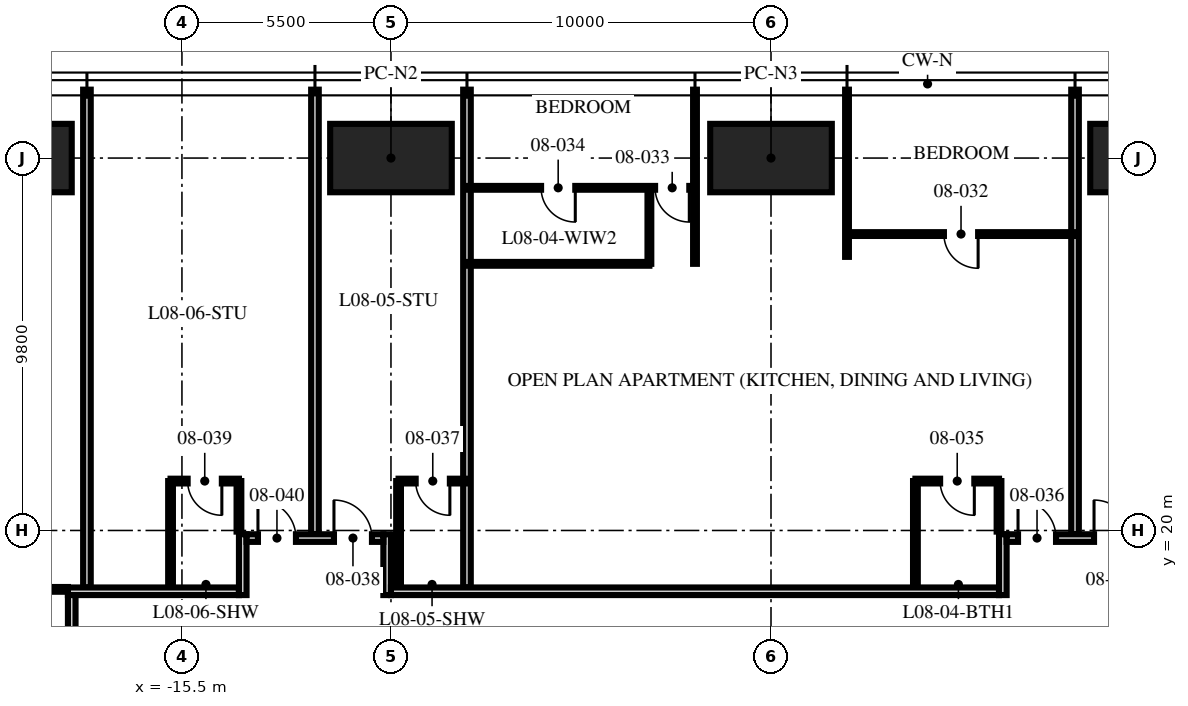
"""IFC4 building model, lengths in metres.
Left out: names, types, materials, properties, quantities, classifications, styles, units other than length and angle.
Written with IfcOpenShell. Run it as: python <this file> out.ifc"""

import sys

from ifc_helpers import new_model, si_unit, direction, frame, frame_2d, origin, origin_2d, place, context, subcontext, project, spatial, rectangle, hollow_rectangle, extrude, element, fill, save


model = new_model("IFC4")
c1 = context("Model", 3, precision=1e-05, world=origin(), true_north=direction((0.0, 1.0)))
c2 = subcontext(c1, "Body", "Model", "MODEL_VIEW")
j1 = project(units=[si_unit("LENGTHUNIT", "METRE"), si_unit("PLANEANGLEUNIT", "RADIAN")], contexts=[c1])
p1 = place(None, origin())
s1 = spatial("IfcSite", under=j1, at=p1, CompositionType="ELEMENT")
p2 = place(p1, origin())
s2 = spatial("IfcBuilding", under=s1, at=p2, CompositionType="ELEMENT")
p3 = place(p2, frame((0.0, 0.0, 36.0)))
s3 = spatial("IfcBuildingStorey", under=s2, at=p3, CompositionType="ELEMENT", Elevation=36.0)
for number, where, z_axis, x_axis in (
    (1, (-20.0, 29.8, 0.0), (0.0, 0.0, 1.0), (1.0, 0.0, 0.0)),
    (2, (-10.0, 29.8, 0.0), (0.0, 0.0, 1.0), (1.0, 0.0, 0.0)),
    (3, (0.0, 29.8, 0.0), (0.0, 0.0, 1.0), (1.0, 0.0, 0.0)),
    (4, (10.0, 29.8, 0.0), (0.0, 0.0, 1.0), (1.0, 0.0, 0.0)),
):
    element("IfcColumn", number, at=place(p3, frame(where, z_axis=z_axis, x_axis=x_axis)), inside=s3, PredefinedType="COLUMN", context=c2, shape_type="SweptSolid", body=[
        extrude(hollow_rectangle(XDim=3.2, YDim=1.8, WallThickness=0.2, at=origin_2d()), origin(), (0.0, 0.0, 1.0), 3.75),
    ])
p4 = place(p3, frame((8.0, 19.9, 0.0), z_axis=(0.0, 0.0, 1.0), x_axis=(0.0, 1.0, 0.0)))
e5 = element("IfcWall", 5, at=p4, inside=s3, PredefinedType="PARTITIONING", context=c2, shape_type="SweptSolid", body=[
    extrude(rectangle(XDim=11.7, YDim=0.2, at=frame_2d((5.85, 0.0))), origin(), (0.0, 0.0, 1.0), 2.71),
])
p5 = place(p3, frame((2.0, 27.2, 0.0), z_axis=(0.0, 0.0, 1.0), x_axis=(0.0, 1.0, 0.0)))
e6 = element("IfcWall", 6, at=p5, inside=s3, PredefinedType="PARTITIONING", context=c2, shape_type="SweptSolid", body=[
    extrude(rectangle(XDim=4.4, YDim=0.1, at=frame_2d((2.2, 0.0))), origin(), (0.0, 0.0, 1.0), 2.71),
])
p6 = place(p3, frame((-2.0, 27.017, 0.0), z_axis=(0.0, 0.0, 1.0), x_axis=(0.0, 1.0, 0.0)))
e7 = element("IfcWall", 7, at=p6, inside=s3, PredefinedType="PARTITIONING", context=c2, shape_type="SweptSolid", body=[
    extrude(rectangle(XDim=4.583, YDim=0.1, at=frame_2d((2.292, 0.0))), origin(), (0.0, 0.0, 1.0), 2.71),
])
p7 = place(p3, frame((-8.0, 18.5, 0.0), z_axis=(0.0, 0.0, 1.0), x_axis=(0.0, 1.0, 0.0)))
e8 = element("IfcWall", 8, at=p7, inside=s3, PredefinedType="PARTITIONING", context=c2, shape_type="SweptSolid", body=[
    extrude(rectangle(XDim=13.1, YDim=0.2, at=frame_2d((6.55, 0.0))), origin(), (0.0, 0.0, 1.0), 2.71),
])
p8 = place(p3, frame((-12.0, 19.9, 0.0), z_axis=(0.0, 0.0, 1.0), x_axis=(0.0, 1.0, 0.0)))
e9 = element("IfcWall", 9, at=p8, inside=s3, PredefinedType="PARTITIONING", context=c2, shape_type="SweptSolid", body=[
    extrude(rectangle(XDim=11.7, YDim=0.2, at=frame_2d((5.85, 0.0))), origin(), (0.0, 0.0, 1.0), 2.71),
])
p9 = place(p3, frame((-18.0, 18.5, 0.0), z_axis=(0.0, 0.0, 1.0), x_axis=(0.0, 1.0, 0.0)))
e10 = element("IfcWall", 10, at=p9, inside=s3, PredefinedType="PARTITIONING", context=c2, shape_type="SweptSolid", body=[
    extrude(rectangle(XDim=13.1, YDim=0.2, at=frame_2d((6.55, 0.0))), origin(), (0.0, 0.0, 1.0), 2.3),
])
p10 = place(p3, frame((8.0, 27.8, 0.0), z_axis=(0.0, 0.0, 1.0), x_axis=(-1.0, 0.0, 0.0)))
e11 = element("IfcWall", 11, at=p10, inside=s3, PredefinedType="PARTITIONING", context=c2, shape_type="SweptSolid", body=[
    extrude(rectangle(XDim=6.0, YDim=0.1, at=frame_2d((3.0, 0.0))), origin(), (0.0, 0.0, 1.0), 2.61),
])
p11 = place(p10, frame((2.55, 0.0, 0.0)))
e12 = element("IfcOpeningElement", 12, at=p11, cuts=e11, PredefinedType="OPENING", context=c2, shape_type="SweptSolid", body=[
    extrude(rectangle(XDim=0.9, YDim=2.1, at=frame_2d((0.45, 1.05))), frame((0.0, 0.06, 0.0), z_axis=(0.0, -1.0, 0.0), x_axis=(1.0, 0.0, 0.0)), (0.0, 0.0, 1.0), 0.12),
])
p12 = place(p3, frame((-2.0, 29.017, 0.0), z_axis=(0.0, 0.0, 1.0), x_axis=(-1.0, 0.0, 0.0)))
e13 = element("IfcWall", 13, at=p12, inside=s3, PredefinedType="PARTITIONING", context=c2, shape_type="SweptSolid", body=[
    extrude(rectangle(XDim=6.0, YDim=0.1, at=frame_2d((3.0, 0.0))), origin(), (0.0, 0.0, 1.0), 2.61),
])
p13 = place(p12, frame((0.15, 0.0, 0.0)))
e14 = element("IfcOpeningElement", 14, at=p13, cuts=e13, PredefinedType="OPENING", context=c2, shape_type="SweptSolid", body=[
    extrude(rectangle(XDim=0.9, YDim=2.1, at=frame_2d((0.45, 1.05))), frame((0.0, 0.06, 0.0), z_axis=(0.0, -1.0, 0.0), x_axis=(1.0, 0.0, 0.0)), (0.0, 0.0, 1.0), 0.12),
])
p14 = place(p12, frame((3.15, 0.0, 0.0)))
e15 = element("IfcOpeningElement", 15, at=p14, cuts=e13, PredefinedType="OPENING", context=c2, shape_type="SweptSolid", body=[
    extrude(rectangle(XDim=0.9, YDim=2.1, at=frame_2d((0.45, 1.05))), frame((0.0, 0.06, 0.0), z_axis=(0.0, -1.0, 0.0), x_axis=(1.0, 0.0, 0.0)), (0.0, 0.0, 1.0), 0.12),
])
p15 = place(p3, frame((-3.2, 27.017, 0.0), z_axis=(0.0, 0.0, 1.0), x_axis=(0.0, 1.0, 0.0)))
e16 = element("IfcWall", 16, at=p15, inside=s3, PredefinedType="PARTITIONING", context=c2, shape_type="SweptSolid", body=[
    extrude(rectangle(XDim=2.0, YDim=0.1, at=frame_2d((1.0, 0.0))), origin(), (0.0, 0.0, 1.0), 3.5),
])
p16 = place(p3, frame((-3.2, 27.017, 0.0), z_axis=(0.0, 0.0, 1.0), x_axis=(-1.0, 0.0, 0.0)))
e17 = element("IfcWall", 17, at=p16, inside=s3, PredefinedType="PARTITIONING", context=c2, shape_type="SweptSolid", body=[
    extrude(rectangle(XDim=4.8, YDim=0.1, at=frame_2d((2.4, 0.0))), origin(), (0.0, 0.0, 1.0), 2.61),
])
p17 = place(p3, frame((6.0, 21.3, 0.0), z_axis=(0.0, 0.0, 1.0), x_axis=(-1.0, 0.0, 0.0)))
e18 = element("IfcWall", 18, at=p17, inside=s3, PredefinedType="PARTITIONING", context=c2, shape_type="SweptSolid", body=[
    extrude(rectangle(XDim=2.2, YDim=0.125, at=frame_2d((1.1, 0.0))), origin(), (0.0, 0.0, 1.0), 2.61),
])
p18 = place(p17, frame((0.65, 0.0, 0.0)))
e19 = element("IfcOpeningElement", 19, at=p18, cuts=e18, PredefinedType="OPENING", context=c2, shape_type="SweptSolid", body=[
    extrude(rectangle(XDim=0.9, YDim=2.1, at=frame_2d((0.45, 1.05))), frame((0.0, 0.073, 0.0), z_axis=(0.0, -1.0, 0.0), x_axis=(1.0, 0.0, 0.0)), (0.0, 0.0, 1.0), 0.145),
])
p19 = place(p3, frame((6.0, 19.97, 0.0), z_axis=(0.0, 0.0, 1.0), x_axis=(0.0, 1.0, 0.0)))
e20 = element("IfcWall", 20, at=p19, inside=s3, PredefinedType="PARTITIONING", context=c2, shape_type="SweptSolid", body=[
    extrude(rectangle(XDim=1.33, YDim=0.125, at=frame_2d((0.665, 0.0))), origin(), (0.0, 0.0, 1.0), 3.5),
])
p20 = place(p3, frame((3.8, 18.5, 0.0), z_axis=(0.0, 0.0, 1.0), x_axis=(0.0, 1.0, 0.0)))
e21 = element("IfcWall", 21, at=p20, inside=s3, PredefinedType="PARTITIONING", context=c2, shape_type="SweptSolid", body=[
    extrude(rectangle(XDim=2.8, YDim=0.125, at=frame_2d((1.4, 0.0))), origin(), (0.0, 0.0, 1.0), 3.5),
])
p21 = place(p3, frame((-8.0, 21.3, 0.0), z_axis=(0.0, 0.0, 1.0), x_axis=(-1.0, 0.0, 0.0)))
e22 = element("IfcWall", 22, at=p21, inside=s3, PredefinedType="PARTITIONING", context=c2, shape_type="SweptSolid", body=[
    extrude(rectangle(XDim=1.8, YDim=0.125, at=frame_2d((0.9, 0.0))), origin(), (0.0, 0.0, 1.0), 3.5),
])
p22 = place(p21, frame((0.45, 0.0, 0.0)))
e23 = element("IfcOpeningElement", 23, at=p22, cuts=e22, PredefinedType="OPENING", context=c2, shape_type="SweptSolid", body=[
    extrude(rectangle(XDim=0.9, YDim=2.1, at=frame_2d((0.45, 1.05))), frame((0.0, 0.073, 0.0), z_axis=(0.0, -1.0, 0.0), x_axis=(1.0, 0.0, 0.0)), (0.0, 0.0, 1.0), 0.145),
])
p23 = place(p3, frame((-9.8, 18.5, 0.0), z_axis=(0.0, 0.0, 1.0), x_axis=(0.0, 1.0, 0.0)))
e24 = element("IfcWall", 24, at=p23, inside=s3, PredefinedType="PARTITIONING", context=c2, shape_type="SweptSolid", body=[
    extrude(rectangle(XDim=2.8, YDim=0.125, at=frame_2d((1.4, 0.0))), origin(), (0.0, 0.0, 1.0), 2.492),
])
p24 = place(p3, frame((-14.0, 21.3, 0.0), z_axis=(0.0, 0.0, 1.0), x_axis=(-1.0, 0.0, 0.0)))
e25 = element("IfcWall", 25, at=p24, inside=s3, PredefinedType="PARTITIONING", context=c2, shape_type="SweptSolid", body=[
    extrude(rectangle(XDim=1.8, YDim=0.125, at=frame_2d((0.9, 0.0))), origin(), (0.0, 0.0, 1.0), 2.61),
])
p25 = place(p24, frame((0.45, 0.0, 0.0)))
e26 = element("IfcOpeningElement", 26, at=p25, cuts=e25, PredefinedType="OPENING", context=c2, shape_type="SweptSolid", body=[
    extrude(rectangle(XDim=0.9, YDim=2.1, at=frame_2d((0.45, 1.05))), frame((0.0, 0.073, 0.0), z_axis=(0.0, -1.0, 0.0), x_axis=(1.0, 0.0, 0.0)), (0.0, 0.0, 1.0), 0.145),
])
p26 = place(p3, frame((-14.0, 19.97, 0.0), z_axis=(0.0, 0.0, 1.0), x_axis=(0.0, 1.0, 0.0)))
e27 = element("IfcWall", 27, at=p26, inside=s3, PredefinedType="PARTITIONING", context=c2, shape_type="SweptSolid", body=[
    extrude(rectangle(XDim=1.33, YDim=0.125, at=frame_2d((0.665, 0.0))), origin(), (0.0, 0.0, 1.0), 3.5),
])
p27 = place(p3, frame((-15.8, 18.5, 0.0), z_axis=(0.0, 0.0, 1.0), x_axis=(0.0, 1.0, 0.0)))
e28 = element("IfcWall", 28, at=p27, inside=s3, PredefinedType="PARTITIONING", context=c2, shape_type="SweptSolid", body=[
    extrude(rectangle(XDim=2.8, YDim=0.125, at=frame_2d((1.4, 0.0))), origin(), (0.0, 0.0, 1.0), 3.5),
])
p28 = place(p3, frame((-18.5, 18.45, 0.0), z_axis=(0.0, 0.0, 1.0), x_axis=(-1.0, 0.0, 0.0)))
e29 = element("IfcWall", 29, at=p28, inside=s3, PredefinedType="PARTITIONING", context=c2, shape_type="SweptSolid", body=[
    extrude(rectangle(XDim=2.8, YDim=0.125, at=frame_2d((1.4, 0.0))), origin(), (0.0, 0.0, 1.0), 2.3),
])
p29 = place(p3, frame((-18.5, 18.4, 0.0), z_axis=(0.0, 0.0, 1.0), x_axis=(1.0, 0.0, 0.0)))
e30 = element("IfcWall", 30, at=p29, inside=s3, PredefinedType="PARTITIONING", context=c2, shape_type="SweptSolid", body=[
    extrude(rectangle(XDim=4.5, YDim=0.2, at=frame_2d((2.25, 0.0))), origin(), (0.0, 0.0, 1.0), 2.3),
])
p30 = place(p3, frame((-13.9, 18.3, 0.0), z_axis=(0.0, 0.0, 1.0), x_axis=(0.0, 1.0, 0.0)))
e31 = element("IfcWall", 31, at=p30, inside=s3, PredefinedType="PARTITIONING", context=c2, shape_type="SweptSolid", body=[
    extrude(rectangle(XDim=1.6, YDim=0.2, at=frame_2d((0.8, 0.0))), origin(), (0.0, 0.0, 1.0), 3.5),
])
p31 = place(p3, frame((-10.1, 18.3, 0.0), z_axis=(0.0, 0.0, 1.0), x_axis=(0.0, 1.0, 0.0)))
e32 = element("IfcWall", 32, at=p31, inside=s3, PredefinedType="PARTITIONING", context=c2, shape_type="SweptSolid", body=[
    extrude(rectangle(XDim=1.6, YDim=0.2, at=frame_2d((0.8, 0.0))), origin(), (0.0, 0.0, 1.0), 2.492),
])
p32 = place(p3, frame((-13.8, 19.8, 0.0), z_axis=(0.0, 0.0, 1.0), x_axis=(1.0, 0.0, 0.0)))
e33 = element("IfcWall", 33, at=p32, inside=s3, PredefinedType="PARTITIONING", context=c2, shape_type="SweptSolid", body=[
    extrude(rectangle(XDim=3.6, YDim=0.2, at=frame_2d((1.8, 0.0))), origin(), (0.0, 0.0, 1.0), 3.5),
])
p33 = place(p32, frame((2.3, 0.0, 0.0)))
e34 = element("IfcOpeningElement", 34, at=p33, cuts=e33, PredefinedType="OPENING", context=c2, shape_type="SweptSolid", body=[
    extrude(rectangle(XDim=1.0, YDim=2.2, at=frame_2d((0.5, 1.1))), frame((0.0, 0.11, 0.0), z_axis=(0.0, -1.0, 0.0), x_axis=(1.0, 0.0, 0.0)), (0.0, 0.0, 1.0), 0.22),
])
p34 = place(p32, frame((0.3, 0.0, 0.0)))
e35 = element("IfcOpeningElement", 35, at=p34, cuts=e33, PredefinedType="OPENING", context=c2, shape_type="SweptSolid", body=[
    extrude(rectangle(XDim=1.0, YDim=2.2, at=frame_2d((0.5, 1.1))), frame((0.0, 0.11, 0.0), z_axis=(0.0, -1.0, 0.0), x_axis=(1.0, 0.0, 0.0)), (0.0, 0.0, 1.0), 0.22),
])
p35 = place(p3, frame((-10.0, 18.4, 0.0), z_axis=(0.0, 0.0, 1.0), x_axis=(1.0, 0.0, 0.0)))
e36 = element("IfcWall", 36, at=p35, inside=s3, PredefinedType="PARTITIONING", context=c2, shape_type="SweptSolid", body=[
    extrude(rectangle(XDim=16.0, YDim=0.2, at=frame_2d((8.0, 0.0))), origin(), (0.0, 0.0, 1.0), 2.492),
])
p36 = place(p3, frame((6.1, 18.3, 0.0), z_axis=(0.0, 0.0, 1.0), x_axis=(0.0, 1.0, 0.0)))
e37 = element("IfcWall", 37, at=p36, inside=s3, PredefinedType="PARTITIONING", context=c2, shape_type="SweptSolid", body=[
    extrude(rectangle(XDim=1.6, YDim=0.2, at=frame_2d((0.8, 0.0))), origin(), (0.0, 0.0, 1.0), 3.5),
])
p37 = place(p3, frame((6.2, 19.8, 0.0), z_axis=(0.0, 0.0, 1.0), x_axis=(1.0, 0.0, 0.0)))
e38 = element("IfcWall", 38, at=p37, inside=s3, PredefinedType="PARTITIONING", context=c2, shape_type="SweptSolid", body=[
    extrude(rectangle(XDim=3.6, YDim=0.2, at=frame_2d((1.8, 0.0))), origin(), (0.0, 0.0, 1.0), 3.5),
])
p38 = place(p37, frame((2.3, 0.0, 0.0)))
e39 = element("IfcOpeningElement", 39, at=p38, cuts=e38, PredefinedType="OPENING", context=c2, shape_type="SweptSolid", body=[
    extrude(rectangle(XDim=1.0, YDim=2.2, at=frame_2d((0.5, 1.1))), frame((0.0, 0.11, 0.0), z_axis=(0.0, -1.0, 0.0), x_axis=(1.0, 0.0, 0.0)), (0.0, 0.0, 1.0), 0.22),
])
p39 = place(p37, frame((0.3, 0.0, 0.0)))
e40 = element("IfcOpeningElement", 40, at=p39, cuts=e38, PredefinedType="OPENING", context=c2, shape_type="SweptSolid", body=[
    extrude(rectangle(XDim=1.0, YDim=2.2, at=frame_2d((0.5, 1.1))), frame((0.0, 0.11, 0.0), z_axis=(0.0, -1.0, 0.0), x_axis=(1.0, 0.0, 0.0)), (0.0, 0.0, 1.0), 0.22),
])
p40 = place(p3, frame((-18.4, 18.3, 0.0), z_axis=(0.0, 0.0, 1.0), x_axis=(0.0, -1.0, 0.0)))
e41 = element("IfcWall", 41, at=p40, inside=s3, PredefinedType="PARTITIONING", context=c2, shape_type="SweptSolid", body=[
    extrude(rectangle(XDim=36.6, YDim=0.2, at=frame_2d((18.3, 0.0))), origin(), (0.0, 0.0, 1.0), 2.3),
])
p41 = place(p40, frame((8.7, 0.0, 0.0)))
e42 = element("IfcOpeningElement", 42, at=p41, cuts=e41, PredefinedType="OPENING", context=c2, shape_type="SweptSolid", body=[
    extrude(rectangle(XDim=1.0, YDim=2.2, at=frame_2d((0.5, 1.1))), frame((0.0, 0.11, 0.0), z_axis=(0.0, -1.0, 0.0), x_axis=(1.0, 0.0, 0.0)), (0.0, 0.0, 1.0), 0.22),
])
p42 = place(p40, frame((14.87, 0.0, 0.0)))
e43 = element("IfcOpeningElement", 43, at=p42, cuts=e41, PredefinedType="OPENING", context=c2, shape_type="SweptSolid", body=[
    extrude(rectangle(XDim=1.0, YDim=2.2, at=frame_2d((0.5, 1.1))), frame((0.0, 0.11, 0.0), z_axis=(0.0, -1.0, 0.0), x_axis=(1.0, 0.0, 0.0)), (0.0, 0.0, 1.0), 0.22),
])
p43 = place(p40, frame((34.82, 0.0, 0.0)))
e44 = element("IfcOpeningElement", 44, at=p43, cuts=e41, PredefinedType="OPENING", context=c2, shape_type="SweptSolid", body=[
    extrude(rectangle(XDim=1.0, YDim=2.2, at=frame_2d((0.5, 1.1))), frame((0.0, 0.11, 0.0), z_axis=(0.0, -1.0, 0.0), x_axis=(1.0, 0.0, 0.0)), (0.0, 0.0, 1.0), 0.22),
])
p44 = place(p38, origin())
e45 = element("IfcDoor", 45, at=p44, inside=s3, OperationType="SINGLE_SWING_LEFT", PredefinedType="DOOR", context=c2, shape_type="SweptSolid", body=[
    extrude(rectangle(XDim=1.0, YDim=2.2, at=frame_2d((0.5, 1.1))), frame((0.0, 0.025, 0.0), z_axis=(0.0, -1.0, 0.0), x_axis=(1.0, 0.0, 0.0)), (0.0, 0.0, 1.0), 0.05),
])
fill(e39, e45)
p45 = place(p11, origin())
e46 = element("IfcDoor", 46, at=p45, inside=s3, OperationType="SINGLE_SWING_LEFT", PredefinedType="DOOR", context=c2, shape_type="SweptSolid", body=[
    extrude(rectangle(XDim=0.9, YDim=2.1, at=frame_2d((0.45, 1.05))), frame((0.0, 0.025, 0.0), z_axis=(0.0, -1.0, 0.0), x_axis=(1.0, 0.0, 0.0)), (0.0, 0.0, 1.0), 0.05),
])
fill(e12, e46)
p46 = place(p13, origin())
e47 = element("IfcDoor", 47, at=p46, inside=s3, OperationType="SINGLE_SWING_LEFT", PredefinedType="DOOR", context=c2, shape_type="SweptSolid", body=[
    extrude(rectangle(XDim=0.9, YDim=2.1, at=frame_2d((0.45, 1.05))), frame((0.0, 0.025, 0.0), z_axis=(0.0, -1.0, 0.0), x_axis=(1.0, 0.0, 0.0)), (0.0, 0.0, 1.0), 0.05),
])
fill(e14, e47)
p47 = place(p14, origin())
e48 = element("IfcDoor", 48, at=p47, inside=s3, OperationType="SINGLE_SWING_LEFT", PredefinedType="DOOR", context=c2, shape_type="SweptSolid", body=[
    extrude(rectangle(XDim=0.9, YDim=2.1, at=frame_2d((0.45, 1.05))), frame((0.0, 0.025, 0.0), z_axis=(0.0, -1.0, 0.0), x_axis=(1.0, 0.0, 0.0)), (0.0, 0.0, 1.0), 0.05),
])
fill(e15, e48)
p48 = place(p18, origin())
e49 = element("IfcDoor", 49, at=p48, inside=s3, OperationType="SINGLE_SWING_LEFT", PredefinedType="DOOR", context=c2, shape_type="SweptSolid", body=[
    extrude(rectangle(XDim=0.9, YDim=2.1, at=frame_2d((0.45, 1.05))), frame((0.0, 0.025, 0.0), z_axis=(0.0, -1.0, 0.0), x_axis=(1.0, 0.0, 0.0)), (0.0, 0.0, 1.0), 0.05),
])
fill(e19, e49)
p49 = place(p39, origin())
e50 = element("IfcDoor", 50, at=p49, inside=s3, OperationType="SINGLE_SWING_LEFT", PredefinedType="DOOR", context=c2, shape_type="SweptSolid", body=[
    extrude(rectangle(XDim=1.0, YDim=2.2, at=frame_2d((0.5, 1.1))), frame((0.0, 0.025, 0.0), z_axis=(0.0, -1.0, 0.0), x_axis=(1.0, 0.0, 0.0)), (0.0, 0.0, 1.0), 0.05),
])
fill(e40, e50)
p50 = place(p22, origin())
e51 = element("IfcDoor", 51, at=p50, inside=s3, OperationType="SINGLE_SWING_LEFT", PredefinedType="DOOR", context=c2, shape_type="SweptSolid", body=[
    extrude(rectangle(XDim=0.9, YDim=2.1, at=frame_2d((0.45, 1.05))), frame((0.0, 0.025, 0.0), z_axis=(0.0, -1.0, 0.0), x_axis=(1.0, 0.0, 0.0)), (0.0, 0.0, 1.0), 0.05),
])
fill(e23, e51)
p51 = place(p33, origin())
e52 = element("IfcDoor", 52, at=p51, inside=s3, OperationType="SINGLE_SWING_LEFT", PredefinedType="DOOR", context=c2, shape_type="SweptSolid", body=[
    extrude(rectangle(XDim=1.0, YDim=2.2, at=frame_2d((0.5, 1.1))), frame((0.0, 0.025, 0.0), z_axis=(0.0, -1.0, 0.0), x_axis=(1.0, 0.0, 0.0)), (0.0, 0.0, 1.0), 0.05),
])
fill(e34, e52)
p52 = place(p25, origin())
e53 = element("IfcDoor", 53, at=p52, inside=s3, OperationType="SINGLE_SWING_LEFT", PredefinedType="DOOR", context=c2, shape_type="SweptSolid", body=[
    extrude(rectangle(XDim=0.9, YDim=2.1, at=frame_2d((0.45, 1.05))), frame((0.0, 0.025, 0.0), z_axis=(0.0, -1.0, 0.0), x_axis=(1.0, 0.0, 0.0)), (0.0, 0.0, 1.0), 0.05),
])
fill(e26, e53)
p53 = place(p34, origin())
e54 = element("IfcDoor", 54, at=p53, inside=s3, OperationType="SINGLE_SWING_LEFT", PredefinedType="DOOR", context=c2, shape_type="SweptSolid", body=[
    extrude(rectangle(XDim=1.0, YDim=2.2, at=frame_2d((0.5, 1.1))), frame((0.0, 0.025, 0.0), z_axis=(0.0, -1.0, 0.0), x_axis=(1.0, 0.0, 0.0)), (0.0, 0.0, 1.0), 0.05),
])
fill(e35, e54)
save(model, sys.argv[1])
